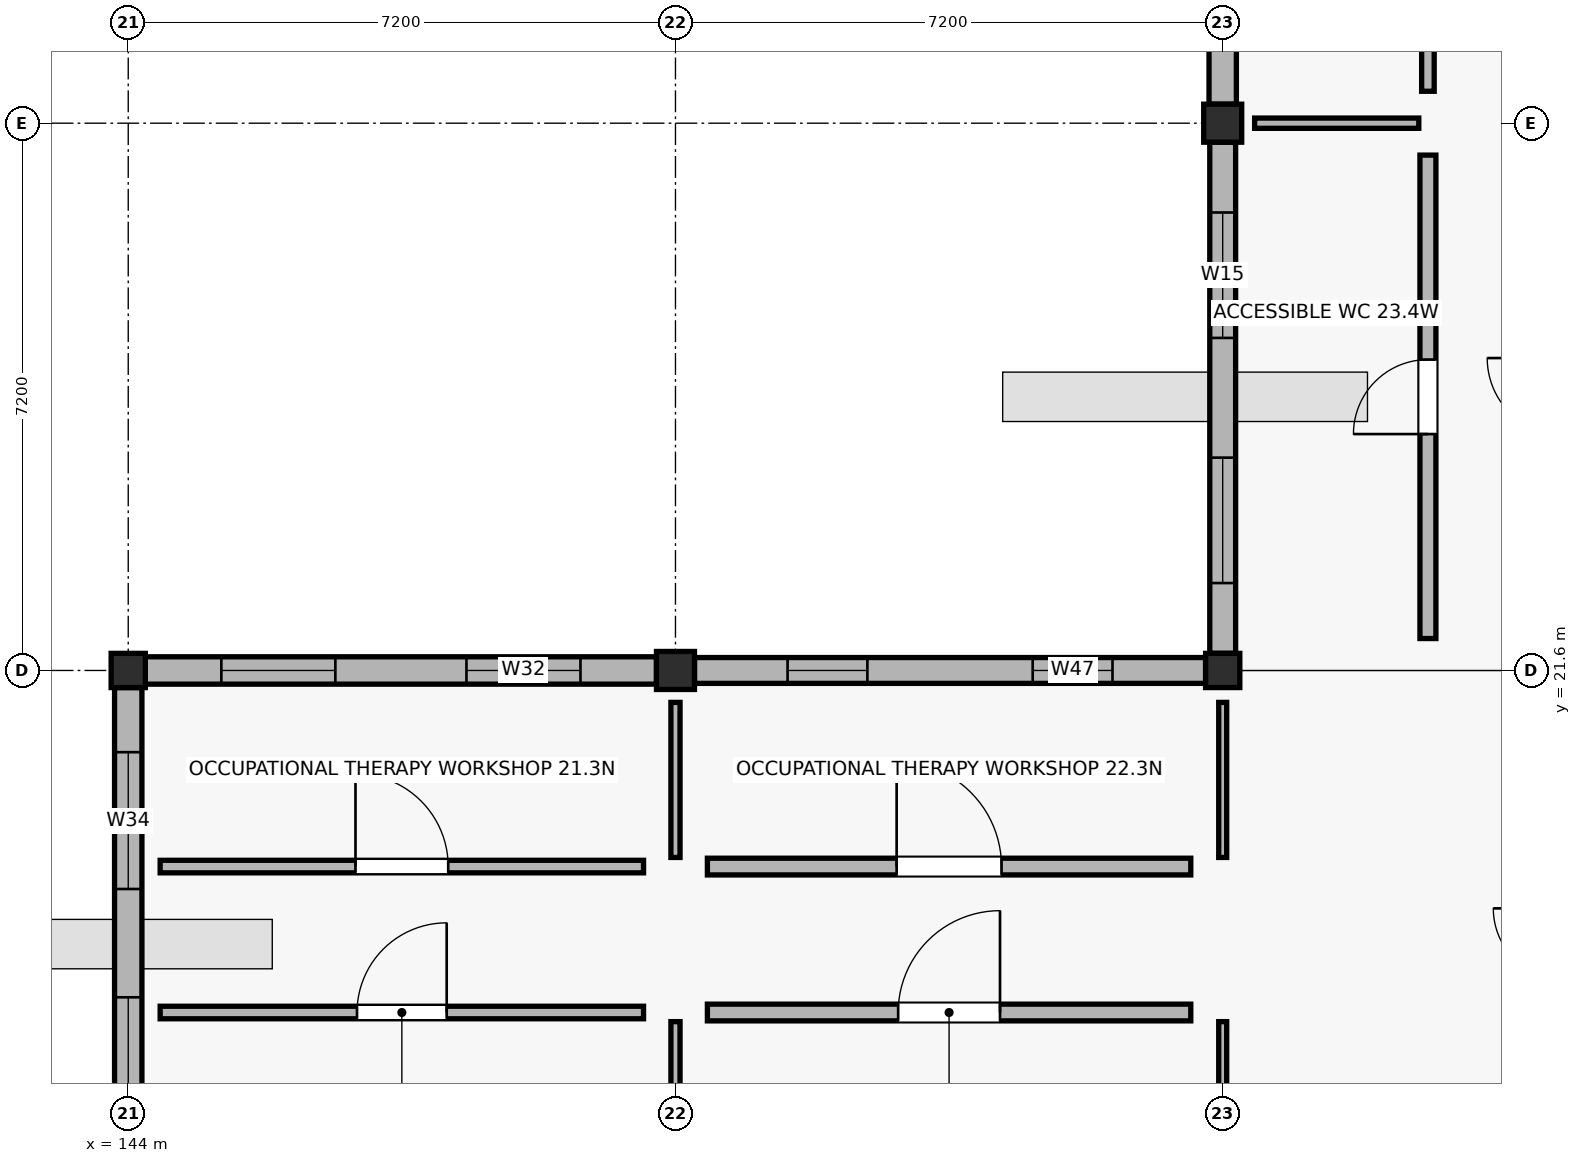
"""IFC4 building model, lengths in metres.
Left out: names, types, materials, properties, quantities, classifications, styles, units other than length and angle.
Written with IfcOpenShell. Run it as: python <this file> out.ifc"""

import sys

from ifc_helpers import new_model, si_unit, direction, frame, frame_2d, origin, origin_2d, place, context, subcontext, project, spatial, rectangle, extrude, element, fill, save


model = new_model("IFC4")
c1 = context("Model", 3, precision=1e-05, world=origin(), true_north=direction((0.0, 1.0)))
c2 = subcontext(c1, "Body", "Model", "MODEL_VIEW")
j1 = project(units=[si_unit("LENGTHUNIT", "METRE"), si_unit("PLANEANGLEUNIT", "RADIAN")], contexts=[c1])
p1 = place(None, origin())
s1 = spatial("IfcSite", under=j1, at=p1, CompositionType="ELEMENT")
p2 = place(p1, origin())
s2 = spatial("IfcBuilding", under=s1, at=p2, CompositionType="ELEMENT")
p3 = place(p2, frame((0.0, 0.0, 4.5)))
s3 = spatial("IfcBuildingStorey", under=s2, at=p3, CompositionType="ELEMENT", Elevation=4.5)
p4 = place(p3, frame((144.0, 21.6, 0.0), z_axis=(0.0, 0.0, 1.0), x_axis=(1.0, 0.0, 0.0)))
e1 = element("IfcColumn", 1, at=p4, inside=s3, PredefinedType="COLUMN", context=c2, shape_type="SweptSolid", body=[
    extrude(rectangle(XDim=0.45, YDim=0.45, at=origin_2d()), origin(), (0.0, 0.0, 1.0), 4.28),
])
p5 = place(p3, frame((151.2, 21.6, 0.0), z_axis=(0.0, 0.0, 1.0), x_axis=(1.0, 0.0, 0.0)))
e2 = element("IfcColumn", 2, at=p5, inside=s3, PredefinedType="COLUMN", context=c2, shape_type="SweptSolid", body=[
    extrude(rectangle(XDim=0.5, YDim=0.5, at=origin_2d()), origin(), (0.0, 0.0, 1.0), 4.28),
])
p6 = place(p3, frame((158.4, 21.6, 0.0), z_axis=(0.0, 0.0, 1.0), x_axis=(1.0, 0.0, 0.0)))
e3 = element("IfcColumn", 3, at=p6, inside=s3, PredefinedType="COLUMN", context=c2, shape_type="SweptSolid", body=[
    extrude(rectangle(XDim=0.45, YDim=0.45, at=origin_2d()), origin(), (0.0, 0.0, 1.0), 4.28),
])
p7 = place(p3, frame((158.4, 28.8, 0.0), z_axis=(0.0, 0.0, 1.0), x_axis=(1.0, 0.0, 0.0)))
e4 = element("IfcColumn", 4, at=p7, inside=s3, PredefinedType="COLUMN", context=c2, shape_type="SweptSolid", body=[
    extrude(rectangle(XDim=0.5, YDim=0.5, at=origin_2d()), origin(), (0.0, 0.0, 1.0), 4.28),
])
p8 = place(p3, frame((150.95, 21.6, 0.0), z_axis=(0.0, 0.0, 1.0), x_axis=(-1.0, 0.0, 0.0)))
e5 = element("IfcWall", 5, at=p8, inside=s3, PredefinedType="SOLIDWALL", context=c2, shape_type="SweptSolid", body=[
    extrude(rectangle(XDim=6.725, YDim=0.36, at=frame_2d((3.362, 0.0))), origin(), (0.0, 0.0, 1.0), 3.47),
])
p9 = place(p8, frame((1.0, 0.0, 0.9)))
e6 = element("IfcOpeningElement", 6, at=p9, cuts=e5, PredefinedType="OPENING", context=c2, shape_type="SweptSolid", body=[
    extrude(rectangle(XDim=1.5, YDim=1.62, at=frame_2d((0.75, 0.81))), frame((0.0, 0.19, 0.0), z_axis=(0.0, -1.0, 0.0), x_axis=(1.0, 0.0, 0.0)), (0.0, 0.0, 1.0), 0.38),
])
p10 = place(p8, frame((4.225, 0.0, 0.9)))
e7 = element("IfcOpeningElement", 7, at=p10, cuts=e5, PredefinedType="OPENING", context=c2, shape_type="SweptSolid", body=[
    extrude(rectangle(XDim=1.5, YDim=1.62, at=frame_2d((0.75, 0.81))), frame((0.0, 0.19, 0.0), z_axis=(0.0, -1.0, 0.0), x_axis=(1.0, 0.0, 0.0)), (0.0, 0.0, 1.0), 0.38),
])
p11 = place(p3, frame((144.0, 21.375, 0.0), z_axis=(0.0, 0.0, 1.0), x_axis=(0.0, -1.0, 0.0)))
e8 = element("IfcWall", 8, at=p11, inside=s3, PredefinedType="SOLIDWALL", context=c2, shape_type="SweptSolid", body=[
    extrude(rectangle(XDim=6.725, YDim=0.36, at=frame_2d((3.363, 0.0))), origin(), (0.0, 0.0, 1.0), 3.52),
])
p12 = place(p11, frame((0.85, 0.0, 0.9)))
e9 = element("IfcOpeningElement", 9, at=p12, cuts=e8, PredefinedType="OPENING", context=c2, shape_type="SweptSolid", body=[
    extrude(rectangle(XDim=1.8, YDim=1.62, at=frame_2d((0.9, 0.81))), frame((0.0, 0.19, 0.0), z_axis=(0.0, -1.0, 0.0), x_axis=(1.0, 0.0, 0.0)), (0.0, 0.0, 1.0), 0.38),
])
p13 = place(p11, frame((4.075, 0.0, 0.9)))
e10 = element("IfcOpeningElement", 10, at=p13, cuts=e8, PredefinedType="OPENING", context=c2, shape_type="SweptSolid", body=[
    extrude(rectangle(XDim=1.8, YDim=1.62, at=frame_2d((0.9, 0.81))), frame((0.0, 0.19, 0.0), z_axis=(0.0, -1.0, 0.0), x_axis=(1.0, 0.0, 0.0)), (0.0, 0.0, 1.0), 0.38),
])
p14 = place(p3, frame((158.175, 21.6, 0.0), z_axis=(0.0, 0.0, 1.0), x_axis=(-1.0, 0.0, 0.0)))
e11 = element("IfcWall", 11, at=p14, inside=s3, PredefinedType="SOLIDWALL", context=c2, shape_type="SweptSolid", body=[
    extrude(rectangle(XDim=6.725, YDim=0.34, at=frame_2d((3.363, 0.0))), origin(), (0.0, 0.0, 1.0), 3.47),
])
p15 = place(p14, frame((1.225, 0.0, 0.9)))
e12 = element("IfcOpeningElement", 12, at=p15, cuts=e11, PredefinedType="OPENING", context=c2, shape_type="SweptSolid", body=[
    extrude(rectangle(XDim=1.05, YDim=1.88, at=frame_2d((0.525, 0.94))), frame((0.0, 0.18, 0.0), z_axis=(0.0, -1.0, 0.0), x_axis=(1.0, 0.0, 0.0)), (0.0, 0.0, 1.0), 0.36),
])
p16 = place(p14, frame((4.45, 0.0, 0.9)))
e13 = element("IfcOpeningElement", 13, at=p16, cuts=e11, PredefinedType="OPENING", context=c2, shape_type="SweptSolid", body=[
    extrude(rectangle(XDim=1.05, YDim=1.88, at=frame_2d((0.525, 0.94))), frame((0.0, 0.18, 0.0), z_axis=(0.0, -1.0, 0.0), x_axis=(1.0, 0.0, 0.0)), (0.0, 0.0, 1.0), 0.36),
])
p17 = place(p3, frame((158.4, 28.55, 0.0), z_axis=(0.0, 0.0, 1.0), x_axis=(0.0, -1.0, 0.0)))
e14 = element("IfcWall", 14, at=p17, inside=s3, PredefinedType="SOLIDWALL", context=c2, shape_type="SweptSolid", body=[
    extrude(rectangle(XDim=6.725, YDim=0.34, at=frame_2d((3.363, 0.0))), origin(), (0.0, 0.0, 1.0), 3.52),
])
p18 = place(p17, frame((0.925, 0.0, 0.9)))
e15 = element("IfcOpeningElement", 15, at=p18, cuts=e14, PredefinedType="OPENING", context=c2, shape_type="SweptSolid", body=[
    extrude(rectangle(XDim=1.65, YDim=1.38, at=frame_2d((0.825, 0.69))), frame((0.0, 0.18, 0.0), z_axis=(0.0, -1.0, 0.0), x_axis=(1.0, 0.0, 0.0)), (0.0, 0.0, 1.0), 0.36),
])
p19 = place(p17, frame((4.15, 0.0, 0.9)))
e16 = element("IfcOpeningElement", 16, at=p19, cuts=e14, PredefinedType="OPENING", context=c2, shape_type="SweptSolid", body=[
    extrude(rectangle(XDim=1.65, YDim=1.38, at=frame_2d((0.825, 0.69))), frame((0.0, 0.18, 0.0), z_axis=(0.0, -1.0, 0.0), x_axis=(1.0, 0.0, 0.0)), (0.0, 0.0, 1.0), 0.36),
])
p20 = place(p3, frame((158.4, 35.775, 0.0), z_axis=(0.0, 0.0, 1.0), x_axis=(0.0, -1.0, 0.0)))
e17 = element("IfcWall", 17, at=p20, inside=s3, PredefinedType="SOLIDWALL", context=c2, shape_type="SweptSolid", body=[
    extrude(rectangle(XDim=6.725, YDim=0.36, at=frame_2d((3.362, 0.0))), origin(), (0.0, 0.0, 1.0), 3.52),
])
p21 = place(p20, frame((1.225, 0.0, 0.9)))
e18 = element("IfcOpeningElement", 18, at=p21, cuts=e17, PredefinedType="OPENING", context=c2, shape_type="SweptSolid", body=[
    extrude(rectangle(XDim=1.05, YDim=1.5, at=frame_2d((0.525, 0.75))), frame((0.0, 0.19, 0.0), z_axis=(0.0, -1.0, 0.0), x_axis=(1.0, 0.0, 0.0)), (0.0, 0.0, 1.0), 0.38),
])
p22 = place(p20, frame((4.45, 0.0, 0.9)))
e19 = element("IfcOpeningElement", 19, at=p22, cuts=e17, PredefinedType="OPENING", context=c2, shape_type="SweptSolid", body=[
    extrude(rectangle(XDim=1.05, YDim=1.5, at=frame_2d((0.525, 0.75))), frame((0.0, 0.19, 0.0), z_axis=(0.0, -1.0, 0.0), x_axis=(1.0, 0.0, 0.0)), (0.0, 0.0, 1.0), 0.38),
])
p23 = place(p3, frame((144.42, 17.1, 0.0), z_axis=(0.0, 0.0, 1.0), x_axis=(1.0, 0.0, 0.0)))
e20 = element("IfcWall", 20, at=p23, inside=s3, PredefinedType="PARTITIONING", context=c2, shape_type="SweptSolid", body=[
    extrude(rectangle(XDim=6.36, YDim=0.165, at=frame_2d((3.18, 0.0))), origin(), (0.0, 0.0, 1.0), 3.36),
])
p24 = place(p23, frame((2.59, 0.0, 0.0)))
e21 = element("IfcOpeningElement", 21, at=p24, cuts=e20, PredefinedType="OPENING", context=c2, shape_type="SweptSolid", body=[
    extrude(rectangle(XDim=1.18, YDim=2.09, at=frame_2d((0.59, 1.045))), frame((0.0, 0.093, 0.0), z_axis=(0.0, -1.0, 0.0), x_axis=(1.0, 0.0, 0.0)), (0.0, 0.0, 1.0), 0.185),
])
p25 = place(p3, frame((151.2, 14.82, 0.0), z_axis=(0.0, 0.0, 1.0), x_axis=(0.0, 1.0, 0.0)))
e22 = element("IfcWall", 22, at=p25, inside=s3, PredefinedType="PARTITIONING", context=c2, shape_type="SweptSolid", body=[
    extrude(rectangle(XDim=2.16, YDim=0.12, at=frame_2d((1.08, 0.0))), origin(), (0.0, 0.0, 1.0), 3.36),
])
p26 = place(p3, frame((144.42, 19.02, 0.0), z_axis=(0.0, 0.0, 1.0), x_axis=(1.0, 0.0, 0.0)))
e23 = element("IfcWall", 23, at=p26, inside=s3, PredefinedType="PARTITIONING", context=c2, shape_type="SweptSolid", body=[
    extrude(rectangle(XDim=6.36, YDim=0.165, at=frame_2d((3.18, 0.0))), origin(), (0.0, 0.0, 1.0), 3.36),
])
p27 = place(p26, frame((2.57, 0.0, 0.0)))
e24 = element("IfcOpeningElement", 24, at=p27, cuts=e23, PredefinedType="OPENING", context=c2, shape_type="SweptSolid", body=[
    extrude(rectangle(XDim=1.22, YDim=2.09, at=frame_2d((0.61, 1.045))), frame((0.0, 0.093, 0.0), z_axis=(0.0, -1.0, 0.0), x_axis=(1.0, 0.0, 0.0)), (0.0, 0.0, 1.0), 0.185),
])
p28 = place(p3, frame((151.2, 19.14, 0.0), z_axis=(0.0, 0.0, 1.0), x_axis=(0.0, 1.0, 0.0)))
e25 = element("IfcWall", 25, at=p28, inside=s3, PredefinedType="PARTITIONING", context=c2, shape_type="SweptSolid", body=[
    extrude(rectangle(XDim=2.04, YDim=0.12, at=frame_2d((1.02, 0.0))), origin(), (0.0, 0.0, 1.0), 3.36),
])
p29 = place(p3, frame((151.62, 17.1, 0.0), z_axis=(0.0, 0.0, 1.0), x_axis=(1.0, 0.0, 0.0)))
e26 = element("IfcWall", 26, at=p29, inside=s3, PredefinedType="SOLIDWALL", context=c2, shape_type="SweptSolid", body=[
    extrude(rectangle(XDim=6.36, YDim=0.22, at=frame_2d((3.18, 0.0))), origin(), (0.0, 0.0, 1.0), 3.36),
])
p30 = place(p29, frame((2.51, 0.0, 0.0)))
e27 = element("IfcOpeningElement", 27, at=p30, cuts=e26, PredefinedType="OPENING", context=c2, shape_type="SweptSolid", body=[
    extrude(rectangle(XDim=1.34, YDim=2.09, at=frame_2d((0.67, 1.045))), frame((0.0, 0.12, 0.0), z_axis=(0.0, -1.0, 0.0), x_axis=(1.0, 0.0, 0.0)), (0.0, 0.0, 1.0), 0.24),
])
p31 = place(p3, frame((158.4, 14.82, 0.0), z_axis=(0.0, 0.0, 1.0), x_axis=(0.0, 1.0, 0.0)))
e28 = element("IfcWall", 28, at=p31, inside=s3, PredefinedType="PARTITIONING", context=c2, shape_type="SweptSolid", body=[
    extrude(rectangle(XDim=2.16, YDim=0.105, at=frame_2d((1.08, 0.0))), origin(), (0.0, 0.0, 1.0), 3.36),
])
p32 = place(p3, frame((151.62, 19.02, 0.0), z_axis=(0.0, 0.0, 1.0), x_axis=(1.0, 0.0, 0.0)))
e29 = element("IfcWall", 29, at=p32, inside=s3, PredefinedType="SOLIDWALL", context=c2, shape_type="SweptSolid", body=[
    extrude(rectangle(XDim=6.36, YDim=0.22, at=frame_2d((3.18, 0.0))), origin(), (0.0, 0.0, 1.0), 3.36),
])
p33 = place(p32, frame((2.49, 0.0, 0.0)))
e30 = element("IfcOpeningElement", 30, at=p33, cuts=e29, PredefinedType="OPENING", context=c2, shape_type="SweptSolid", body=[
    extrude(rectangle(XDim=1.38, YDim=2.09, at=frame_2d((0.69, 1.045))), frame((0.0, 0.12, 0.0), z_axis=(0.0, -1.0, 0.0), x_axis=(1.0, 0.0, 0.0)), (0.0, 0.0, 1.0), 0.24),
])
p34 = place(p3, frame((158.4, 19.14, 0.0), z_axis=(0.0, 0.0, 1.0), x_axis=(0.0, 1.0, 0.0)))
e31 = element("IfcWall", 31, at=p34, inside=s3, PredefinedType="PARTITIONING", context=c2, shape_type="SweptSolid", body=[
    extrude(rectangle(XDim=2.04, YDim=0.105, at=frame_2d((1.02, 0.0))), origin(), (0.0, 0.0, 1.0), 3.36),
])
p35 = place(p3, frame((161.1, 22.02, 0.0), z_axis=(0.0, 0.0, 1.0), x_axis=(0.0, 1.0, 0.0)))
e32 = element("IfcWall", 32, at=p35, inside=s3, PredefinedType="PLUMBINGWALL", context=c2, shape_type="SweptSolid", body=[
    extrude(rectangle(XDim=6.36, YDim=0.21, at=frame_2d((3.18, 0.0))), origin(), (0.0, 0.0, 1.0), 3.36),
])
p36 = place(p35, frame((2.69, 0.0, 0.0)))
e33 = element("IfcOpeningElement", 33, at=p36, cuts=e32, PredefinedType="OPENING", context=c2, shape_type="SweptSolid", body=[
    extrude(rectangle(XDim=0.98, YDim=2.14, at=frame_2d((0.49, 1.07))), frame((0.0, 0.115, 0.0), z_axis=(0.0, -1.0, 0.0), x_axis=(1.0, 0.0, 0.0)), (0.0, 0.0, 1.0), 0.23),
])
p37 = place(p3, frame((158.82, 28.8, 0.0), z_axis=(0.0, 0.0, 1.0), x_axis=(1.0, 0.0, 0.0)))
e34 = element("IfcWall", 34, at=p37, inside=s3, PredefinedType="PARTITIONING", context=c2, shape_type="SweptSolid", body=[
    extrude(rectangle(XDim=2.16, YDim=0.135, at=frame_2d((1.08, 0.0))), origin(), (0.0, 0.0, 1.0), 3.36),
])
p38 = place(p3, frame((161.1, 29.22, 0.0), z_axis=(0.0, 0.0, 1.0), x_axis=(0.0, 1.0, 0.0)))
e35 = element("IfcWall", 35, at=p38, inside=s3, PredefinedType="PARTITIONING", context=c2, shape_type="SweptSolid", body=[
    extrude(rectangle(XDim=6.36, YDim=0.165, at=frame_2d((3.18, 0.0))), origin(), (0.0, 0.0, 1.0), 3.36),
])
p39 = place(p38, frame((2.65, 0.0, 0.0)))
e36 = element("IfcOpeningElement", 36, at=p39, cuts=e35, PredefinedType="OPENING", context=c2, shape_type="SweptSolid", body=[
    extrude(rectangle(XDim=1.06, YDim=2.14, at=frame_2d((0.53, 1.07))), frame((0.0, 0.093, 0.0), z_axis=(0.0, -1.0, 0.0), x_axis=(1.0, 0.0, 0.0)), (0.0, 0.0, 1.0), 0.185),
])
p40 = place(p9, origin())
e37 = element("IfcWindow", 37, at=p40, inside=s3, PartitioningType="SINGLE_PANEL", PredefinedType="WINDOW", context=c2, shape_type="SweptSolid", body=[
    extrude(rectangle(XDim=1.5, YDim=1.62, at=frame_2d((0.75, 0.81))), frame((0.0, 0.03, 0.0), z_axis=(0.0, -1.0, 0.0), x_axis=(1.0, 0.0, 0.0)), (0.0, 0.0, 1.0), 0.06),
])
fill(e6, e37)
p41 = place(p10, origin())
e38 = element("IfcWindow", 38, at=p41, inside=s3, PartitioningType="SINGLE_PANEL", PredefinedType="WINDOW", context=c2, shape_type="SweptSolid", body=[
    extrude(rectangle(XDim=1.5, YDim=1.62, at=frame_2d((0.75, 0.81))), frame((0.0, 0.03, 0.0), z_axis=(0.0, -1.0, 0.0), x_axis=(1.0, 0.0, 0.0)), (0.0, 0.0, 1.0), 0.06),
])
fill(e7, e38)
p42 = place(p12, origin())
e39 = element("IfcWindow", 39, at=p42, inside=s3, PartitioningType="SINGLE_PANEL", PredefinedType="WINDOW", context=c2, shape_type="SweptSolid", body=[
    extrude(rectangle(XDim=1.8, YDim=1.62, at=frame_2d((0.9, 0.81))), frame((0.0, 0.03, 0.0), z_axis=(0.0, -1.0, 0.0), x_axis=(1.0, 0.0, 0.0)), (0.0, 0.0, 1.0), 0.06),
])
fill(e9, e39)
p43 = place(p13, origin())
e40 = element("IfcWindow", 40, at=p43, inside=s3, PartitioningType="SINGLE_PANEL", PredefinedType="WINDOW", context=c2, shape_type="SweptSolid", body=[
    extrude(rectangle(XDim=1.8, YDim=1.62, at=frame_2d((0.9, 0.81))), frame((0.0, 0.03, 0.0), z_axis=(0.0, -1.0, 0.0), x_axis=(1.0, 0.0, 0.0)), (0.0, 0.0, 1.0), 0.06),
])
fill(e10, e40)
p44 = place(p15, origin())
e41 = element("IfcWindow", 41, at=p44, inside=s3, PartitioningType="SINGLE_PANEL", PredefinedType="WINDOW", context=c2, shape_type="SweptSolid", body=[
    extrude(rectangle(XDim=1.05, YDim=1.88, at=frame_2d((0.525, 0.94))), frame((0.0, 0.03, 0.0), z_axis=(0.0, -1.0, 0.0), x_axis=(1.0, 0.0, 0.0)), (0.0, 0.0, 1.0), 0.06),
])
fill(e12, e41)
p45 = place(p16, origin())
e42 = element("IfcWindow", 42, at=p45, inside=s3, PartitioningType="SINGLE_PANEL", PredefinedType="WINDOW", context=c2, shape_type="SweptSolid", body=[
    extrude(rectangle(XDim=1.05, YDim=1.88, at=frame_2d((0.525, 0.94))), frame((0.0, 0.03, 0.0), z_axis=(0.0, -1.0, 0.0), x_axis=(1.0, 0.0, 0.0)), (0.0, 0.0, 1.0), 0.06),
])
fill(e13, e42)
p46 = place(p18, origin())
e43 = element("IfcWindow", 43, at=p46, inside=s3, PartitioningType="SINGLE_PANEL", PredefinedType="WINDOW", context=c2, shape_type="SweptSolid", body=[
    extrude(rectangle(XDim=1.65, YDim=1.38, at=frame_2d((0.825, 0.69))), frame((0.0, 0.03, 0.0), z_axis=(0.0, -1.0, 0.0), x_axis=(1.0, 0.0, 0.0)), (0.0, 0.0, 1.0), 0.06),
])
fill(e15, e43)
p47 = place(p19, origin())
e44 = element("IfcWindow", 44, at=p47, inside=s3, PartitioningType="SINGLE_PANEL", PredefinedType="WINDOW", context=c2, shape_type="SweptSolid", body=[
    extrude(rectangle(XDim=1.65, YDim=1.38, at=frame_2d((0.825, 0.69))), frame((0.0, 0.03, 0.0), z_axis=(0.0, -1.0, 0.0), x_axis=(1.0, 0.0, 0.0)), (0.0, 0.0, 1.0), 0.06),
])
fill(e16, e44)
p48 = place(p24, origin())
e45 = element("IfcDoor", 45, at=p48, inside=s3, OperationType="SINGLE_SWING_RIGHT", PredefinedType="DOOR", context=c2, shape_type="SweptSolid", body=[
    extrude(rectangle(XDim=1.18, YDim=2.09, at=frame_2d((0.59, 1.045))), frame((0.0, 0.025, 0.0), z_axis=(0.0, -1.0, 0.0), x_axis=(1.0, 0.0, 0.0)), (0.0, 0.0, 1.0), 0.05),
])
fill(e21, e45)
p49 = place(p27, origin())
e46 = element("IfcDoor", 46, at=p49, inside=s3, OperationType="SINGLE_SWING_LEFT", PredefinedType="DOOR", context=c2, shape_type="SweptSolid", body=[
    extrude(rectangle(XDim=1.22, YDim=2.09, at=frame_2d((0.61, 1.045))), frame((0.0, 0.025, 0.0), z_axis=(0.0, -1.0, 0.0), x_axis=(1.0, 0.0, 0.0)), (0.0, 0.0, 1.0), 0.05),
])
fill(e24, e46)
p50 = place(p30, origin())
e47 = element("IfcDoor", 47, at=p50, inside=s3, OperationType="SINGLE_SWING_RIGHT", PredefinedType="DOOR", context=c2, shape_type="SweptSolid", body=[
    extrude(rectangle(XDim=1.34, YDim=2.09, at=frame_2d((0.67, 1.045))), frame((0.0, 0.025, 0.0), z_axis=(0.0, -1.0, 0.0), x_axis=(1.0, 0.0, 0.0)), (0.0, 0.0, 1.0), 0.05),
])
fill(e27, e47)
p51 = place(p33, origin())
e48 = element("IfcDoor", 48, at=p51, inside=s3, OperationType="SINGLE_SWING_LEFT", PredefinedType="DOOR", context=c2, shape_type="SweptSolid", body=[
    extrude(rectangle(XDim=1.38, YDim=2.09, at=frame_2d((0.69, 1.045))), frame((0.0, 0.025, 0.0), z_axis=(0.0, -1.0, 0.0), x_axis=(1.0, 0.0, 0.0)), (0.0, 0.0, 1.0), 0.05),
])
fill(e30, e48)
p52 = place(p36, origin())
e49 = element("IfcDoor", 49, at=p52, inside=s3, OperationType="SINGLE_SWING_LEFT", PredefinedType="DOOR", context=c2, shape_type="SweptSolid", body=[
    extrude(rectangle(XDim=0.98, YDim=2.14, at=frame_2d((0.49, 1.07))), frame((0.0, 0.025, 0.0), z_axis=(0.0, -1.0, 0.0), x_axis=(1.0, 0.0, 0.0)), (0.0, 0.0, 1.0), 0.05),
])
fill(e33, e49)
save(model, sys.argv[1])
